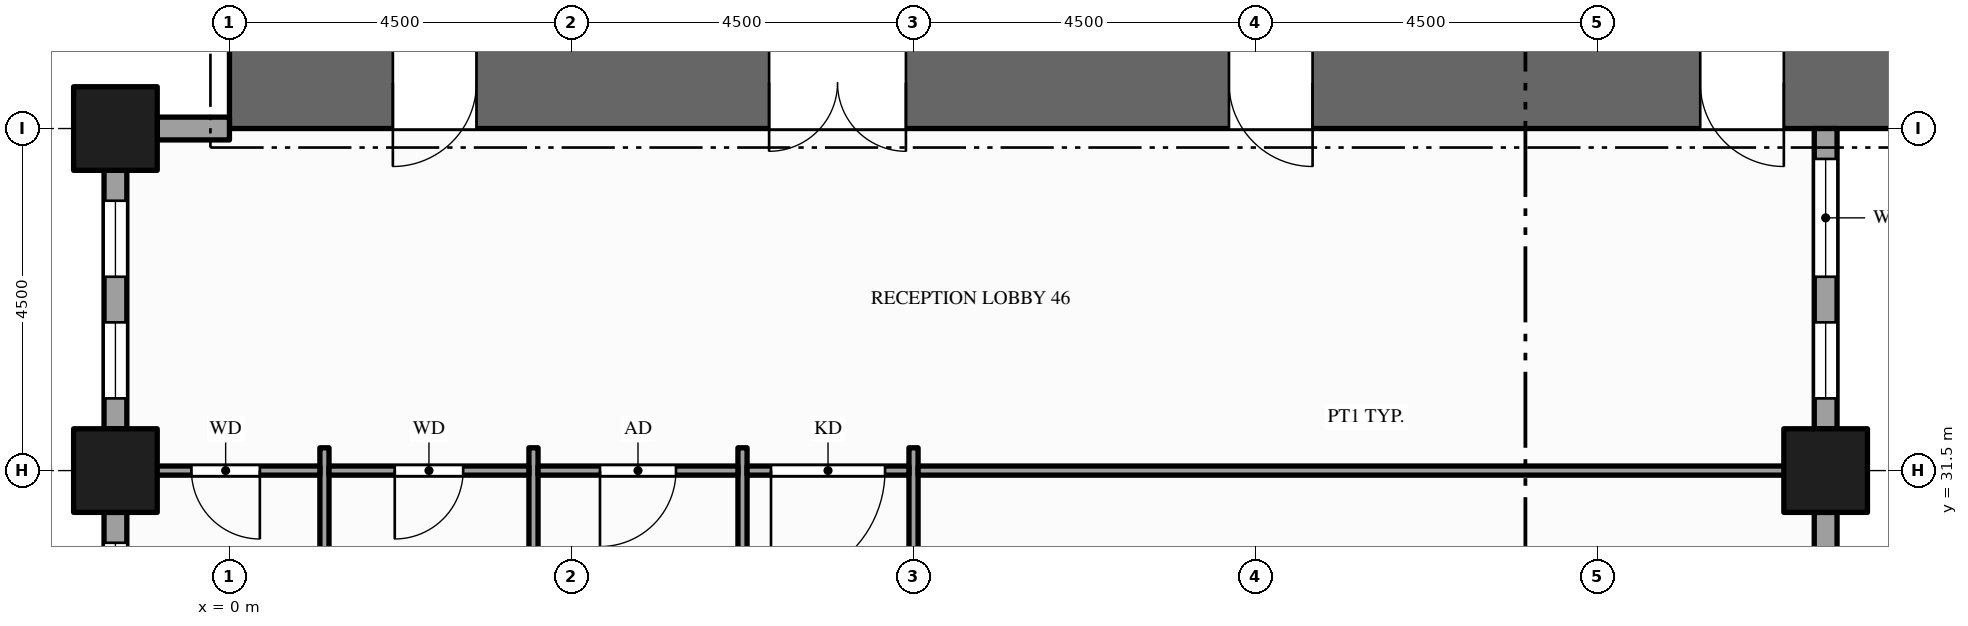
"""IFC4 building model, lengths in metres.
Left out: names, types, materials, properties, quantities, classifications, styles, units other than length and angle.
Written with IfcOpenShell. Run it as: python <this file> out.ifc"""

import sys

from ifc_helpers import new_model, si_unit, direction, frame, frame_2d, origin, origin_2d, place, context, subcontext, project, spatial, rectangle, hollow_rectangle, extrude, element, fill, save


model = new_model("IFC4")
c1 = context("Model", 3, precision=1e-05, world=origin(), true_north=direction((0.0, 1.0)))
c2 = subcontext(c1, "Body", "Model", "MODEL_VIEW")
j1 = project(units=[si_unit("LENGTHUNIT", "METRE"), si_unit("PLANEANGLEUNIT", "RADIAN")], contexts=[c1])
p1 = place(None, origin())
s1 = spatial("IfcSite", under=j1, at=p1, CompositionType="ELEMENT")
p2 = place(p1, origin())
s2 = spatial("IfcBuilding", under=s1, at=p2, CompositionType="ELEMENT")
p3 = place(p2, frame((0.0, 0.0, 41.0)))
s3 = spatial("IfcBuildingStorey", under=s2, at=p3, CompositionType="ELEMENT", Elevation=41.0)
p4 = place(p3, frame((0.0, 36.6, -0.15), z_axis=(0.0, 0.0, 1.0), x_axis=(1.0, 0.0, 0.0)))
e1 = element("IfcWall", 1, at=p4, inside=s3, PredefinedType="SHEAR", context=c2, shape_type="SweptSolid", body=[
    extrude(rectangle(XDim=22.5, YDim=1.2, at=frame_2d((11.25, 0.0))), origin(), (0.0, 0.0, 1.0), 4.0),
])
p5 = place(p4, frame((7.1, 0.0, 0.15)))
e2 = element("IfcOpeningElement", 2, at=p5, cuts=e1, PredefinedType="OPENING", context=c2, shape_type="SweptSolid", body=[
    extrude(rectangle(XDim=1.8, YDim=2.1, at=frame_2d((0.9, 1.05))), frame((0.0, 0.61, 0.0), z_axis=(0.0, -1.0, 0.0), x_axis=(1.0, 0.0, 0.0)), (0.0, 0.0, 1.0), 1.22),
])
p6 = place(p4, frame((13.15, 0.0, 0.15)))
e3 = element("IfcOpeningElement", 3, at=p6, cuts=e1, PredefinedType="OPENING", context=c2, shape_type="SweptSolid", body=[
    extrude(rectangle(XDim=1.1, YDim=2.1, at=frame_2d((0.55, 1.05))), frame((0.0, 0.61, 0.0), z_axis=(0.0, -1.0, 0.0), x_axis=(1.0, 0.0, 0.0)), (0.0, 0.0, 1.0), 1.22),
])
p7 = place(p4, frame((2.15, 0.0, 0.15)))
e4 = element("IfcOpeningElement", 4, at=p7, cuts=e1, PredefinedType="OPENING", context=c2, shape_type="SweptSolid", body=[
    extrude(rectangle(XDim=1.1, YDim=2.1, at=frame_2d((0.55, 1.05))), frame((0.0, 0.61, 0.0), z_axis=(0.0, -1.0, 0.0), x_axis=(1.0, 0.0, 0.0)), (0.0, 0.0, 1.0), 1.22),
])
p8 = place(p4, frame((19.35, 0.0, 0.15)))
e5 = element("IfcOpeningElement", 5, at=p8, cuts=e1, PredefinedType="OPENING", context=c2, shape_type="SweptSolid", body=[
    extrude(rectangle(XDim=1.1, YDim=2.1, at=frame_2d((0.55, 1.05))), frame((0.0, 0.61, 0.0), z_axis=(0.0, -1.0, 0.0), x_axis=(1.0, 0.0, 0.0)), (0.0, 0.0, 1.0), 1.22),
])
for number, where, z_axis, x_axis in (
    (6, (-1.5, 31.5, -0.15), (0.0, 0.0, 1.0), (1.0, 0.0, 0.0)),
    (7, (-1.5, 36.0, -0.15), (0.0, 0.0, 1.0), (1.0, 0.0, 0.0)),
    (8, (21.0, 31.5, -0.15), (0.0, 0.0, 1.0), (1.0, 0.0, 0.0)),
):
    element("IfcColumn", number, at=place(p3, frame(where, z_axis=z_axis, x_axis=x_axis)), inside=s3, PredefinedType="COLUMN", context=c2, shape_type="SweptSolid", body=[
        extrude(hollow_rectangle(XDim=1.1, YDim=1.1, WallThickness=0.06, at=origin_2d()), origin(), (0.0, 0.0, 1.0), 4.0),
    ])
p9 = place(p3, frame((21.0, 29.05, 0.0), z_axis=(0.0, 0.0, 1.0), x_axis=(0.0, 1.0, 0.0)))
e9 = element("IfcWall", 9, at=p9, inside=s3, PredefinedType="STANDARD", context=c2, shape_type="SweptSolid", body=[
    extrude(rectangle(XDim=1.9, YDim=0.3, at=frame_2d((0.95, 0.0))), origin(), (0.0, 0.0, 1.0), 3.144),
])
p10 = place(p3, frame((21.0, 32.05, 0.0), z_axis=(0.0, 0.0, 1.0), x_axis=(0.0, 1.0, 0.0)))
e10 = element("IfcWall", 10, at=p10, inside=s3, PredefinedType="STANDARD", context=c2, shape_type="SweptSolid", body=[
    extrude(rectangle(XDim=3.95, YDim=0.3, at=frame_2d((1.975, 0.0))), origin(), (0.0, 0.0, 1.0), 3.144),
])
p11 = place(p10, frame((0.4, 0.0, 0.9)))
e11 = element("IfcOpeningElement", 11, at=p11, cuts=e10, PredefinedType="OPENING", context=c2, shape_type="SweptSolid", body=[
    extrude(rectangle(XDim=1.0, YDim=2.0, at=frame_2d((0.5, 1.0))), frame((0.0, 0.16, 0.0), z_axis=(0.0, -1.0, 0.0), x_axis=(1.0, 0.0, 0.0)), (0.0, 0.0, 1.0), 0.32),
])
p12 = place(p10, frame((2.0, 0.0, 0.9)))
e12 = element("IfcOpeningElement", 12, at=p12, cuts=e10, PredefinedType="OPENING", context=c2, shape_type="SweptSolid", body=[
    extrude(rectangle(XDim=1.55, YDim=2.0, at=frame_2d((0.775, 1.0))), frame((0.0, 0.16, 0.0), z_axis=(0.0, -1.0, 0.0), x_axis=(1.0, 0.0, 0.0)), (0.0, 0.0, 1.0), 0.32),
])
p13 = place(p3, frame((0.0, 36.0, 0.0), z_axis=(0.0, 0.0, 1.0), x_axis=(-1.0, 0.0, 0.0)))
e13 = element("IfcWall", 13, at=p13, inside=s3, PredefinedType="STANDARD", context=c2, shape_type="SweptSolid", body=[
    extrude(rectangle(XDim=0.95, YDim=0.3, at=frame_2d((0.475, 0.0))), origin(), (0.0, 0.0, 1.0), 2.938),
])
p14 = place(p3, frame((-1.5, 35.45, 0.0), z_axis=(0.0, 0.0, 1.0), x_axis=(0.0, -1.0, 0.0)))
e14 = element("IfcWall", 14, at=p14, inside=s3, PredefinedType="STANDARD", context=c2, shape_type="SweptSolid", body=[
    extrude(rectangle(XDim=3.4, YDim=0.3, at=frame_2d((1.7, 0.0))), origin(), (0.0, 0.0, 1.0), 3.144),
])
p15 = place(p14, frame((0.4, 0.0, 0.9)))
e15 = element("IfcOpeningElement", 15, at=p15, cuts=e14, PredefinedType="OPENING", context=c2, shape_type="SweptSolid", body=[
    extrude(rectangle(XDim=1.0, YDim=2.0, at=frame_2d((0.5, 1.0))), frame((0.0, 0.16, 0.0), z_axis=(0.0, -1.0, 0.0), x_axis=(1.0, 0.0, 0.0)), (0.0, 0.0, 1.0), 0.32),
])
p16 = place(p14, frame((2.0, 0.0, 0.9)))
e16 = element("IfcOpeningElement", 16, at=p16, cuts=e14, PredefinedType="OPENING", context=c2, shape_type="SweptSolid", body=[
    extrude(rectangle(XDim=1.0, YDim=2.0, at=frame_2d((0.5, 1.0))), frame((0.0, 0.16, 0.0), z_axis=(0.0, -1.0, 0.0), x_axis=(1.0, 0.0, 0.0)), (0.0, 0.0, 1.0), 0.32),
])
p17 = place(p3, frame((-1.5, 30.95, 0.0), z_axis=(0.0, 0.0, 1.0), x_axis=(0.0, -1.0, 0.0)))
e17 = element("IfcWall", 17, at=p17, inside=s3, PredefinedType="STANDARD", context=c2, shape_type="SweptSolid", body=[
    extrude(rectangle(XDim=3.4, YDim=0.3, at=frame_2d((1.7, 0.0))), origin(), (0.0, 0.0, 1.0), 3.144),
])
p18 = place(p17, frame((0.4, 0.0, 0.9)))
e18 = element("IfcOpeningElement", 18, at=p18, cuts=e17, PredefinedType="OPENING", context=c2, shape_type="SweptSolid", body=[
    extrude(rectangle(XDim=1.0, YDim=2.0, at=frame_2d((0.5, 1.0))), frame((0.0, 0.16, 0.0), z_axis=(0.0, -1.0, 0.0), x_axis=(1.0, 0.0, 0.0)), (0.0, 0.0, 1.0), 0.32),
])
p19 = place(p17, frame((2.0, 0.0, 0.9)))
e19 = element("IfcOpeningElement", 19, at=p19, cuts=e17, PredefinedType="OPENING", context=c2, shape_type="SweptSolid", body=[
    extrude(rectangle(XDim=1.0, YDim=2.0, at=frame_2d((0.5, 1.0))), frame((0.0, 0.16, 0.0), z_axis=(0.0, -1.0, 0.0), x_axis=(1.0, 0.0, 0.0)), (0.0, 0.0, 1.0), 0.32),
])
for number, where, z_axis, x_axis in (
    (20, (1.25, 26.7, 0.0), (0.0, 0.0, 1.0), (0.0, 1.0, 0.0)),
    (21, (4.0, 26.7, 0.0), (0.0, 0.0, 1.0), (0.0, 1.0, 0.0)),
):
    element("IfcWall", number, at=place(p3, frame(where, z_axis=z_axis, x_axis=x_axis)), inside=s3, PredefinedType="PARTITIONING", context=c2, shape_type="SweptSolid", body=[
        extrude(rectangle(XDim=5.1, YDim=0.12, at=frame_2d((2.55, 0.0))), origin(), (0.0, 0.0, 1.0), 3.85),
    ])
p20 = place(p3, frame((6.75, 13.2, 0.0), z_axis=(0.0, 0.0, 1.0), x_axis=(0.0, 1.0, 0.0)))
e22 = element("IfcWall", 22, at=p20, inside=s3, PredefinedType="PARTITIONING", context=c2, shape_type="SweptSolid", body=[
    extrude(rectangle(XDim=18.6, YDim=0.12, at=frame_2d((9.3, 0.0))), origin(), (0.0, 0.0, 1.0), 2.6),
])
p21 = place(p20, frame((3.175, 0.0, 0.0)))
e23 = element("IfcOpeningElement", 23, at=p21, cuts=e22, PredefinedType="OPENING", context=c2, shape_type="SweptSolid", body=[
    extrude(rectangle(XDim=1.0, YDim=2.1, at=frame_2d((0.5, 1.05))), frame((0.0, 0.07, 0.0), z_axis=(0.0, -1.0, 0.0), x_axis=(1.0, 0.0, 0.0)), (0.0, 0.0, 1.0), 0.14),
])
p22 = place(p20, frame((9.955, 0.0, 0.0)))
e24 = element("IfcOpeningElement", 24, at=p22, cuts=e22, PredefinedType="OPENING", context=c2, shape_type="SweptSolid", body=[
    extrude(rectangle(XDim=1.0, YDim=2.1, at=frame_2d((0.5, 1.05))), frame((0.0, 0.07, 0.0), z_axis=(0.0, -1.0, 0.0), x_axis=(1.0, 0.0, 0.0)), (0.0, 0.0, 1.0), 0.14),
])
p23 = place(p3, frame((9.0, 13.2, 0.0), z_axis=(0.0, 0.0, 1.0), x_axis=(0.0, 1.0, 0.0)))
e25 = element("IfcWall", 25, at=p23, inside=s3, PredefinedType="PARTITIONING", context=c2, shape_type="SweptSolid", body=[
    extrude(rectangle(XDim=18.6, YDim=0.12, at=frame_2d((9.3, 0.0))), origin(), (0.0, 0.0, 1.0), 2.6),
])
p24 = place(p23, frame((14.325, 0.0, 0.0)))
e26 = element("IfcOpeningElement", 26, at=p24, cuts=e25, PredefinedType="OPENING", context=c2, shape_type="SweptSolid", body=[
    extrude(rectangle(XDim=1.2, YDim=2.1, at=frame_2d((0.6, 1.05))), frame((0.0, 0.07, 0.0), z_axis=(0.0, -1.0, 0.0), x_axis=(1.0, 0.0, 0.0)), (0.0, 0.0, 1.0), 0.14),
])
p25 = place(p23, frame((4.2, 0.0, 0.0)))
e27 = element("IfcOpeningElement", 27, at=p25, cuts=e25, PredefinedType="OPENING", context=c2, shape_type="SweptSolid", body=[
    extrude(rectangle(XDim=1.2, YDim=2.1, at=frame_2d((0.6, 1.05))), frame((0.0, 0.07, 0.0), z_axis=(0.0, -1.0, 0.0), x_axis=(1.0, 0.0, 0.0)), (0.0, 0.0, 1.0), 0.14),
])
p26 = place(p3, frame((-1.35, 31.5, 0.0), z_axis=(0.0, 0.0, 1.0), x_axis=(1.0, 0.0, 0.0)))
e28 = element("IfcWall", 28, at=p26, inside=s3, PredefinedType="PARTITIONING", context=c2, shape_type="SweptSolid", body=[
    extrude(rectangle(XDim=2.54, YDim=0.12, at=frame_2d((1.27, 0.0))), origin(), (0.0, 0.0, 1.0), 2.938),
])
p27 = place(p26, frame((0.85, 0.0, 0.0)))
e29 = element("IfcOpeningElement", 29, at=p27, cuts=e28, PredefinedType="OPENING", context=c2, shape_type="SweptSolid", body=[
    extrude(rectangle(XDim=0.9, YDim=2.1, at=frame_2d((0.45, 1.05))), frame((0.0, 0.07, 0.0), z_axis=(0.0, -1.0, 0.0), x_axis=(1.0, 0.0, 0.0)), (0.0, 0.0, 1.0), 0.14),
])
p28 = place(p3, frame((1.31, 31.5, 0.0), z_axis=(0.0, 0.0, 1.0), x_axis=(1.0, 0.0, 0.0)))
e30 = element("IfcWall", 30, at=p28, inside=s3, PredefinedType="PARTITIONING", context=c2, shape_type="SweptSolid", body=[
    extrude(rectangle(XDim=2.63, YDim=0.12, at=frame_2d((1.315, 0.0))), origin(), (0.0, 0.0, 1.0), 2.938),
])
p29 = place(p28, frame((0.865, 0.0, 0.0)))
e31 = element("IfcOpeningElement", 31, at=p29, cuts=e30, PredefinedType="OPENING", context=c2, shape_type="SweptSolid", body=[
    extrude(rectangle(XDim=0.9, YDim=2.1, at=frame_2d((0.45, 1.05))), frame((0.0, 0.07, 0.0), z_axis=(0.0, -1.0, 0.0), x_axis=(1.0, 0.0, 0.0)), (0.0, 0.0, 1.0), 0.14),
])
p30 = place(p3, frame((4.06, 31.5, 0.0), z_axis=(0.0, 0.0, 1.0), x_axis=(1.0, 0.0, 0.0)))
e32 = element("IfcWall", 32, at=p30, inside=s3, PredefinedType="PARTITIONING", context=c2, shape_type="SweptSolid", body=[
    extrude(rectangle(XDim=2.63, YDim=0.12, at=frame_2d((1.315, 0.0))), origin(), (0.0, 0.0, 1.0), 2.938),
])
p31 = place(p30, frame((0.815, 0.0, 0.0)))
e33 = element("IfcOpeningElement", 33, at=p31, cuts=e32, PredefinedType="OPENING", context=c2, shape_type="SweptSolid", body=[
    extrude(rectangle(XDim=1.0, YDim=2.1, at=frame_2d((0.5, 1.05))), frame((0.0, 0.07, 0.0), z_axis=(0.0, -1.0, 0.0), x_axis=(1.0, 0.0, 0.0)), (0.0, 0.0, 1.0), 0.14),
])
p32 = place(p3, frame((6.81, 31.5, 0.0), z_axis=(0.0, 0.0, 1.0), x_axis=(1.0, 0.0, 0.0)))
e34 = element("IfcWall", 34, at=p32, inside=s3, PredefinedType="PARTITIONING", context=c2, shape_type="SweptSolid", body=[
    extrude(rectangle(XDim=2.13, YDim=0.12, at=frame_2d((1.065, 0.0))), origin(), (0.0, 0.0, 1.0), 2.938),
])
p33 = place(p32, frame((0.315, 0.0, 0.0)))
e35 = element("IfcOpeningElement", 35, at=p33, cuts=e34, PredefinedType="OPENING", context=c2, shape_type="SweptSolid", body=[
    extrude(rectangle(XDim=1.5, YDim=2.1, at=frame_2d((0.75, 1.05))), frame((0.0, 0.07, 0.0), z_axis=(0.0, -1.0, 0.0), x_axis=(1.0, 0.0, 0.0)), (0.0, 0.0, 1.0), 0.14),
])
p34 = place(p3, frame((9.06, 31.5, 0.0), z_axis=(0.0, 0.0, 1.0), x_axis=(1.0, 0.0, 0.0)))
e36 = element("IfcWall", 36, at=p34, inside=s3, PredefinedType="PARTITIONING", context=c2, shape_type="SweptSolid", body=[
    extrude(rectangle(XDim=11.79, YDim=0.12, at=frame_2d((5.895, 0.0))), origin(), (0.0, 0.0, 1.0), 2.938),
])
p35 = place(p11, origin())
e37 = element("IfcWindow", 37, at=p35, inside=s3, PartitioningType="SINGLE_PANEL", PredefinedType="WINDOW", context=c2, shape_type="SweptSolid", body=[
    extrude(rectangle(XDim=1.0, YDim=2.0, at=frame_2d((0.5, 1.0))), frame((0.0, 0.03, 0.0), z_axis=(0.0, -1.0, 0.0), x_axis=(1.0, 0.0, 0.0)), (0.0, 0.0, 1.0), 0.06),
])
fill(e11, e37)
p36 = place(p12, origin())
e38 = element("IfcWindow", 38, at=p36, inside=s3, PartitioningType="SINGLE_PANEL", PredefinedType="WINDOW", context=c2, shape_type="SweptSolid", body=[
    extrude(rectangle(XDim=1.55, YDim=2.0, at=frame_2d((0.775, 1.0))), frame((0.0, 0.03, 0.0), z_axis=(0.0, -1.0, 0.0), x_axis=(1.0, 0.0, 0.0)), (0.0, 0.0, 1.0), 0.06),
])
fill(e12, e38)
p37 = place(p15, origin())
e39 = element("IfcWindow", 39, at=p37, inside=s3, PartitioningType="SINGLE_PANEL", PredefinedType="WINDOW", context=c2, shape_type="SweptSolid", body=[
    extrude(rectangle(XDim=1.0, YDim=2.0, at=frame_2d((0.5, 1.0))), frame((0.0, 0.03, 0.0), z_axis=(0.0, -1.0, 0.0), x_axis=(1.0, 0.0, 0.0)), (0.0, 0.0, 1.0), 0.06),
])
fill(e15, e39)
p38 = place(p16, origin())
e40 = element("IfcWindow", 40, at=p38, inside=s3, PartitioningType="SINGLE_PANEL", PredefinedType="WINDOW", context=c2, shape_type="SweptSolid", body=[
    extrude(rectangle(XDim=1.0, YDim=2.0, at=frame_2d((0.5, 1.0))), frame((0.0, 0.03, 0.0), z_axis=(0.0, -1.0, 0.0), x_axis=(1.0, 0.0, 0.0)), (0.0, 0.0, 1.0), 0.06),
])
fill(e16, e40)
p39 = place(p18, origin())
e41 = element("IfcWindow", 41, at=p39, inside=s3, PartitioningType="SINGLE_PANEL", PredefinedType="WINDOW", context=c2, shape_type="SweptSolid", body=[
    extrude(rectangle(XDim=1.0, YDim=2.0, at=frame_2d((0.5, 1.0))), frame((0.0, 0.03, 0.0), z_axis=(0.0, -1.0, 0.0), x_axis=(1.0, 0.0, 0.0)), (0.0, 0.0, 1.0), 0.06),
])
fill(e18, e41)
p40 = place(p5, origin())
e42 = element("IfcDoor", 42, at=p40, inside=s3, OperationType="DOUBLE_DOOR_SINGLE_SWING", PredefinedType="DOOR", context=c2, shape_type="SweptSolid", body=[
    extrude(rectangle(XDim=1.8, YDim=2.1, at=frame_2d((0.9, 1.05))), frame((0.0, 0.025, 0.0), z_axis=(0.0, -1.0, 0.0), x_axis=(1.0, 0.0, 0.0)), (0.0, 0.0, 1.0), 0.05),
])
fill(e2, e42)
p41 = place(p6, origin())
e43 = element("IfcDoor", 43, at=p41, inside=s3, OperationType="SINGLE_SWING_RIGHT", PredefinedType="DOOR", context=c2, shape_type="SweptSolid", body=[
    extrude(rectangle(XDim=1.1, YDim=2.1, at=frame_2d((0.55, 1.05))), frame((0.0, 0.025, 0.0), z_axis=(0.0, -1.0, 0.0), x_axis=(1.0, 0.0, 0.0)), (0.0, 0.0, 1.0), 0.05),
])
fill(e3, e43)
p42 = place(p7, origin())
e44 = element("IfcDoor", 44, at=p42, inside=s3, OperationType="SINGLE_SWING_LEFT", PredefinedType="DOOR", context=c2, shape_type="SweptSolid", body=[
    extrude(rectangle(XDim=1.1, YDim=2.1, at=frame_2d((0.55, 1.05))), frame((0.0, 0.025, 0.0), z_axis=(0.0, -1.0, 0.0), x_axis=(1.0, 0.0, 0.0)), (0.0, 0.0, 1.0), 0.05),
])
fill(e4, e44)
p43 = place(p8, origin())
e45 = element("IfcDoor", 45, at=p43, inside=s3, OperationType="SINGLE_SWING_RIGHT", PredefinedType="DOOR", context=c2, shape_type="SweptSolid", body=[
    extrude(rectangle(XDim=1.1, YDim=2.1, at=frame_2d((0.55, 1.05))), frame((0.0, 0.025, 0.0), z_axis=(0.0, -1.0, 0.0), x_axis=(1.0, 0.0, 0.0)), (0.0, 0.0, 1.0), 0.05),
])
fill(e5, e45)
p44 = place(p33, origin())
e46 = element("IfcDoor", 46, at=p44, inside=s3, OperationType="SINGLE_SWING_LEFT", PredefinedType="DOOR", context=c2, shape_type="SweptSolid", body=[
    extrude(rectangle(XDim=1.5, YDim=2.1, at=frame_2d((0.75, 1.05))), frame((0.0, 0.025, 0.0), z_axis=(0.0, -1.0, 0.0), x_axis=(1.0, 0.0, 0.0)), (0.0, 0.0, 1.0), 0.05),
])
fill(e35, e46)
p45 = place(p27, origin())
e47 = element("IfcDoor", 47, at=p45, inside=s3, OperationType="SINGLE_SWING_RIGHT", PredefinedType="DOOR", context=c2, shape_type="SweptSolid", body=[
    extrude(rectangle(XDim=0.9, YDim=2.1, at=frame_2d((0.45, 1.05))), frame((0.0, 0.025, 0.0), z_axis=(0.0, -1.0, 0.0), x_axis=(1.0, 0.0, 0.0)), (0.0, 0.0, 1.0), 0.05),
])
fill(e29, e47)
p46 = place(p29, origin())
e48 = element("IfcDoor", 48, at=p46, inside=s3, OperationType="SINGLE_SWING_LEFT", PredefinedType="DOOR", context=c2, shape_type="SweptSolid", body=[
    extrude(rectangle(XDim=0.9, YDim=2.1, at=frame_2d((0.45, 1.05))), frame((0.0, 0.025, 0.0), z_axis=(0.0, -1.0, 0.0), x_axis=(1.0, 0.0, 0.0)), (0.0, 0.0, 1.0), 0.05),
])
fill(e31, e48)
p47 = place(p31, origin())
e49 = element("IfcDoor", 49, at=p47, inside=s3, OperationType="SINGLE_SWING_LEFT", PredefinedType="DOOR", context=c2, shape_type="SweptSolid", body=[
    extrude(rectangle(XDim=1.0, YDim=2.1, at=frame_2d((0.5, 1.05))), frame((0.0, 0.025, 0.0), z_axis=(0.0, -1.0, 0.0), x_axis=(1.0, 0.0, 0.0)), (0.0, 0.0, 1.0), 0.05),
])
fill(e33, e49)
save(model, sys.argv[1])
